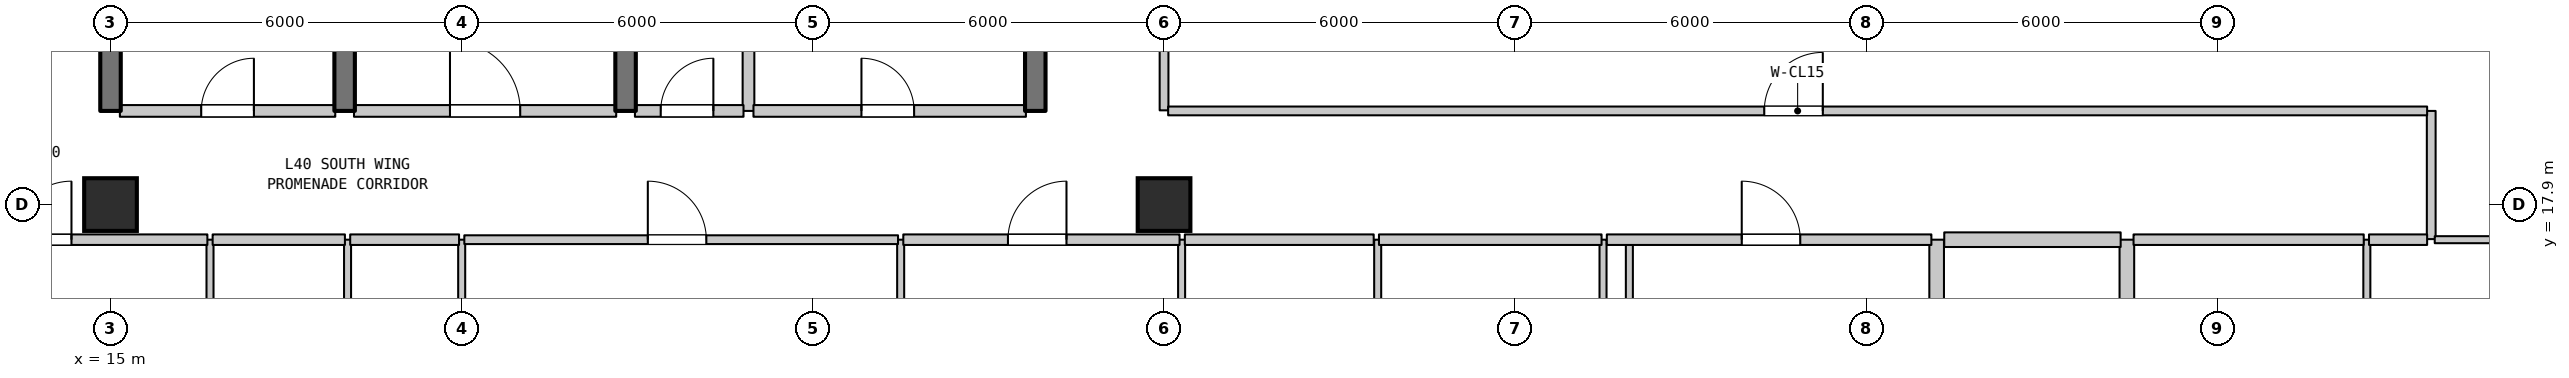
"""IFC4 building model, lengths in metres.
Left out: names, types, materials, properties, quantities, classifications, styles, units other than length and angle.
Written with IfcOpenShell. Run it as: python <this file> out.ifc"""

import sys

from ifc_helpers import new_model, si_unit, direction, frame, frame_2d, origin, origin_2d, place, context, subcontext, project, spatial, rectangle, extrude, element, fill, save


model = new_model("IFC4")
c1 = context("Model", 3, precision=1e-05, world=origin(), true_north=direction((0.0, 1.0)))
c2 = subcontext(c1, "Body", "Model", "MODEL_VIEW")
j1 = project(units=[si_unit("LENGTHUNIT", "METRE"), si_unit("PLANEANGLEUNIT", "RADIAN")], contexts=[c1])
p1 = place(None, origin())
s1 = spatial("IfcSite", under=j1, at=p1, CompositionType="ELEMENT")
p2 = place(p1, origin())
s2 = spatial("IfcBuilding", under=s1, at=p2, CompositionType="ELEMENT")
p3 = place(p2, frame((0.0, 0.0, 164.6)))
s3 = spatial("IfcBuildingStorey", under=s2, at=p3, CompositionType="ELEMENT", Elevation=164.6)
for number, where, z_axis, x_axis in (
    (1, (15.0, 17.9, 0.0), (0.0, 0.0, 1.0), (1.0, 0.0, 0.0)),
    (2, (33.0, 17.9, 0.0), (0.0, 0.0, 1.0), (1.0, 0.0, 0.0)),
):
    element("IfcColumn", number, at=place(p3, frame(where, z_axis=z_axis, x_axis=x_axis)), inside=s3, PredefinedType="COLUMN", context=c2, shape_type="SweptSolid", body=[
        extrude(rectangle(XDim=0.9, YDim=0.9, at=origin_2d()), origin(), (0.0, 0.0, 1.0), 4.5),
    ])
p4 = place(p3, frame((15.0, 19.5, 0.0), z_axis=(0.0, 0.0, 1.0), x_axis=(0.0, 1.0, 0.0)))
e3 = element("IfcWall", 3, at=p4, inside=s3, PredefinedType="SHEAR", context=c2, shape_type="SweptSolid", body=[
    extrude(rectangle(XDim=3.2, YDim=0.35, at=frame_2d((1.6, 0.0))), origin(), (0.0, 0.0, 1.0), 4.19),
])
p5 = place(p3, frame((16.7, 14.1, 0.0), z_axis=(0.0, 0.0, 1.0), x_axis=(0.0, 1.0, 0.0)))
e4 = element("IfcWall", 4, at=p5, inside=s3, PredefinedType="PARTITIONING", context=c2, shape_type="SweptSolid", body=[
    extrude(rectangle(XDim=3.2, YDim=0.12, at=frame_2d((1.6, 0.0))), origin(), (0.0, 0.0, 1.0), 4.19),
])
p6 = place(p5, frame((1.15, 0.0, 0.0)))
e5 = element("IfcOpeningElement", 5, at=p6, cuts=e4, PredefinedType="OPENING", context=c2, shape_type="SweptSolid", body=[
    extrude(rectangle(XDim=0.9, YDim=2.15, at=frame_2d((0.45, 1.075))), frame((0.0, 0.07, 0.0), z_axis=(0.0, -1.0, 0.0), x_axis=(1.0, 0.0, 0.0)), (0.0, 0.0, 1.0), 0.14),
])
p7 = place(p3, frame((19.0, 19.5, 0.0), z_axis=(0.0, 0.0, 1.0), x_axis=(0.0, 1.0, 0.0)))
e6 = element("IfcWall", 6, at=p7, inside=s3, PredefinedType="SHEAR", context=c2, shape_type="SweptSolid", body=[
    extrude(rectangle(XDim=3.2, YDim=0.35, at=frame_2d((1.6, 0.0))), origin(), (0.0, 0.0, 1.0), 4.19),
])
p8 = place(p3, frame((19.05, 14.1, 0.0), z_axis=(0.0, 0.0, 1.0), x_axis=(0.0, 1.0, 0.0)))
e7 = element("IfcWall", 7, at=p8, inside=s3, PredefinedType="PARTITIONING", context=c2, shape_type="SweptSolid", body=[
    extrude(rectangle(XDim=3.2, YDim=0.12, at=frame_2d((1.6, 0.0))), origin(), (0.0, 0.0, 1.0), 4.19),
])
p9 = place(p3, frame((21.0, 6.71, 0.0), z_axis=(0.0, 0.0, 1.0), x_axis=(0.0, 1.0, 0.0)))
e8 = element("IfcWall", 8, at=p9, inside=s3, PredefinedType="PARTITIONING", context=c2, shape_type="SweptSolid", body=[
    extrude(rectangle(XDim=10.59, YDim=0.12, at=frame_2d((5.295, 0.0))), origin(), (0.0, 0.0, 1.0), 4.19),
])
p10 = place(p3, frame((23.8, 19.5, 0.0), z_axis=(0.0, 0.0, 1.0), x_axis=(0.0, 1.0, 0.0)))
e9 = element("IfcWall", 9, at=p10, inside=s3, PredefinedType="SHEAR", context=c2, shape_type="SweptSolid", body=[
    extrude(rectangle(XDim=3.2, YDim=0.35, at=frame_2d((1.6, 0.0))), origin(), (0.0, 0.0, 1.0), 4.19),
])
p11 = place(p3, frame((25.9, 19.5, 0.0), z_axis=(0.0, 0.0, 1.0), x_axis=(0.0, 1.0, 0.0)))
e10 = element("IfcWall", 10, at=p11, inside=s3, PredefinedType="STANDARD", context=c2, shape_type="SweptSolid", body=[
    extrude(rectangle(XDim=3.2, YDim=0.2, at=frame_2d((1.6, 0.0))), origin(), (0.0, 0.0, 1.0), 4.19),
])
p12 = place(p3, frame((28.5, 14.85, 0.0), z_axis=(0.0, 0.0, 1.0), x_axis=(0.0, 1.0, 0.0)))
e11 = element("IfcWall", 11, at=p12, inside=s3, PredefinedType="PARTITIONING", context=c2, shape_type="SweptSolid", body=[
    extrude(rectangle(XDim=2.45, YDim=0.12, at=frame_2d((1.225, 0.0))), origin(), (0.0, 0.0, 1.0), 4.19),
])
p13 = place(p3, frame((30.8, 19.5, 0.0), z_axis=(0.0, 0.0, 1.0), x_axis=(0.0, 1.0, 0.0)))
e12 = element("IfcWall", 12, at=p13, inside=s3, PredefinedType="SHEAR", context=c2, shape_type="SweptSolid", body=[
    extrude(rectangle(XDim=3.2, YDim=0.35, at=frame_2d((1.6, 0.0))), origin(), (0.0, 0.0, 1.0), 4.19),
])
p14 = place(p3, frame((33.0, 19.51, 0.0), z_axis=(0.0, 0.0, 1.0), x_axis=(0.0, 1.0, 0.0)))
e13 = element("IfcWall", 13, at=p14, inside=s3, PredefinedType="STANDARD", context=c2, shape_type="SweptSolid", body=[
    extrude(rectangle(XDim=5.35, YDim=0.15, at=frame_2d((2.675, 0.0))), origin(), (0.0, 0.0, 1.0), 3.79),
])
p15 = place(p14, frame((1.534, 0.0, 0.0)))
e14 = element("IfcOpeningElement", 14, at=p15, cuts=e13, PredefinedType="OPENING", context=c2, shape_type="SweptSolid", body=[
    extrude(rectangle(XDim=1.0, YDim=2.15, at=frame_2d((0.5, 1.075))), frame((0.0, 0.085, 0.0), z_axis=(0.0, -1.0, 0.0), x_axis=(1.0, 0.0, 0.0)), (0.0, 0.0, 1.0), 0.17),
])
for number, where, z_axis, x_axis in (
    (15, (33.3, 11.15, 0.0), (0.0, 0.0, 1.0), (0.0, 1.0, 0.0)),
    (16, (36.65, 11.15, 0.0), (0.0, 0.0, 1.0), (0.0, 1.0, 0.0)),
    (17, (40.5, 11.15, 0.0), (0.0, 0.0, 1.0), (0.0, 1.0, 0.0)),
):
    element("IfcWall", number, at=place(p3, frame(where, z_axis=z_axis, x_axis=x_axis)), inside=s3, PredefinedType="PARTITIONING", context=c2, shape_type="SweptSolid", body=[
        extrude(rectangle(XDim=6.15, YDim=0.12, at=frame_2d((3.075, 0.0))), origin(), (0.0, 0.0, 1.0), 4.19),
    ])
p16 = place(p3, frame((40.95, 14.85, 0.0), z_axis=(0.0, 0.0, 1.0), x_axis=(0.0, 1.0, 0.0)))
e18 = element("IfcWall", 18, at=p16, inside=s3, PredefinedType="PARTITIONING", context=c2, shape_type="SweptSolid", body=[
    extrude(rectangle(XDim=2.45, YDim=0.12, at=frame_2d((1.225, 0.0))), origin(), (0.0, 0.0, 1.0), 4.19),
])
for number, where, z_axis, x_axis in (
    (19, (46.2, 11.15, 0.0), (0.0, 0.0, 1.0), (0.0, 1.0, 0.0)),
    (20, (49.45, 11.15, 0.0), (0.0, 0.0, 1.0), (0.0, 1.0, 0.0)),
):
    element("IfcWall", number, at=place(p3, frame(where, z_axis=z_axis, x_axis=x_axis)), inside=s3, PredefinedType="STANDARD", context=c2, shape_type="SweptSolid", body=[
        extrude(rectangle(XDim=6.15, YDim=0.25, at=frame_2d((3.075, 0.0))), origin(), (0.0, 0.0, 1.0), 4.19),
    ])
p17 = place(p3, frame((53.55, 11.15, 0.0), z_axis=(0.0, 0.0, 1.0), x_axis=(0.0, 1.0, 0.0)))
e21 = element("IfcWall", 21, at=p17, inside=s3, PredefinedType="PARTITIONING", context=c2, shape_type="SweptSolid", body=[
    extrude(rectangle(XDim=6.15, YDim=0.12, at=frame_2d((3.075, 0.0))), origin(), (0.0, 0.0, 1.0), 4.19),
])
p18 = place(p3, frame((54.65, 17.31, 0.0), z_axis=(0.0, 0.0, 1.0), x_axis=(0.0, 1.0, 0.0)))
e22 = element("IfcWall", 22, at=p18, inside=s3, PredefinedType="STANDARD", context=c2, shape_type="SweptSolid", body=[
    extrude(rectangle(XDim=2.19, YDim=0.15, at=frame_2d((1.095, 0.0))), origin(), (0.0, 0.0, 1.0), 4.19),
])
p19 = place(p3, frame((12.875, 17.3, 0.0), z_axis=(0.0, 0.0, 1.0), x_axis=(1.0, 0.0, 0.0)))
e23 = element("IfcWall", 23, at=p19, inside=s3, PredefinedType="STANDARD", context=c2, shape_type="SweptSolid", body=[
    extrude(rectangle(XDim=3.78, YDim=0.18, at=frame_2d((1.89, 0.0))), origin(), (0.0, 0.0, 1.0), 4.19),
])
p20 = place(p19, frame((0.458, 0.0, 0.0)))
e24 = element("IfcOpeningElement", 24, at=p20, cuts=e23, PredefinedType="OPENING", context=c2, shape_type="SweptSolid", body=[
    extrude(rectangle(XDim=1.0, YDim=2.15, at=frame_2d((0.5, 1.075))), frame((0.0, 0.1, 0.0), z_axis=(0.0, -1.0, 0.0), x_axis=(1.0, 0.0, 0.0)), (0.0, 0.0, 1.0), 0.2),
])
p21 = place(p3, frame((16.745, 17.3, 0.0), z_axis=(0.0, 0.0, 1.0), x_axis=(1.0, 0.0, 0.0)))
e25 = element("IfcWall", 25, at=p21, inside=s3, PredefinedType="STANDARD", context=c2, shape_type="SweptSolid", body=[
    extrude(rectangle(XDim=2.26, YDim=0.18, at=frame_2d((1.13, 0.0))), origin(), (0.0, 0.0, 1.0), 4.19),
])
p22 = place(p3, frame((19.095, 17.3, 0.0), z_axis=(0.0, 0.0, 1.0), x_axis=(1.0, 0.0, 0.0)))
e26 = element("IfcWall", 26, at=p22, inside=s3, PredefinedType="STANDARD", context=c2, shape_type="SweptSolid", body=[
    extrude(rectangle(XDim=1.86, YDim=0.18, at=frame_2d((0.93, 0.0))), origin(), (0.0, 0.0, 1.0), 4.19),
])
p23 = place(p3, frame((21.045, 17.3, 0.0), z_axis=(0.0, 0.0, 1.0), x_axis=(1.0, 0.0, 0.0)))
e27 = element("IfcWall", 27, at=p23, inside=s3, PredefinedType="STANDARD", context=c2, shape_type="SweptSolid", body=[
    extrude(rectangle(XDim=7.41, YDim=0.15, at=frame_2d((3.705, 0.0))), origin(), (0.0, 0.0, 1.0), 4.19),
])
p24 = place(p23, frame((3.135, 0.0, 0.0)))
e28 = element("IfcOpeningElement", 28, at=p24, cuts=e27, PredefinedType="OPENING", context=c2, shape_type="SweptSolid", body=[
    extrude(rectangle(XDim=1.0, YDim=2.15, at=frame_2d((0.5, 1.075))), frame((0.0, 0.085, 0.0), z_axis=(0.0, -1.0, 0.0), x_axis=(1.0, 0.0, 0.0)), (0.0, 0.0, 1.0), 0.17),
])
p25 = place(p3, frame((28.545, 17.3, 0.0), z_axis=(0.0, 0.0, 1.0), x_axis=(1.0, 0.0, 0.0)))
e29 = element("IfcWall", 29, at=p25, inside=s3, PredefinedType="STANDARD", context=c2, shape_type="SweptSolid", body=[
    extrude(rectangle(XDim=4.72, YDim=0.18, at=frame_2d((2.36, 0.0))), origin(), (0.0, 0.0, 1.0), 4.19),
])
p26 = place(p25, frame((1.788, 0.0, 0.0)))
e30 = element("IfcOpeningElement", 30, at=p26, cuts=e29, PredefinedType="OPENING", context=c2, shape_type="SweptSolid", body=[
    extrude(rectangle(XDim=1.0, YDim=2.15, at=frame_2d((0.5, 1.075))), frame((0.0, 0.1, 0.0), z_axis=(0.0, -1.0, 0.0), x_axis=(1.0, 0.0, 0.0)), (0.0, 0.0, 1.0), 0.2),
])
p27 = place(p3, frame((33.355, 17.3, 0.0), z_axis=(0.0, 0.0, 1.0), x_axis=(1.0, 0.0, 0.0)))
e31 = element("IfcWall", 31, at=p27, inside=s3, PredefinedType="STANDARD", context=c2, shape_type="SweptSolid", body=[
    extrude(rectangle(XDim=3.227, YDim=0.18, at=frame_2d((1.614, 0.0))), origin(), (0.0, 0.0, 1.0), 4.19),
])
p28 = place(p3, frame((36.672, 17.3, 0.0), z_axis=(0.0, 0.0, 1.0), x_axis=(1.0, 0.0, 0.0)))
e32 = element("IfcWall", 32, at=p28, inside=s3, PredefinedType="STANDARD", context=c2, shape_type="SweptSolid", body=[
    extrude(rectangle(XDim=3.803, YDim=0.18, at=frame_2d((1.901, 0.0))), origin(), (0.0, 0.0, 1.0), 4.19),
])
p29 = place(p3, frame((40.565, 17.3, 0.0), z_axis=(0.0, 0.0, 1.0), x_axis=(1.0, 0.0, 0.0)))
e33 = element("IfcWall", 33, at=p29, inside=s3, PredefinedType="STANDARD", context=c2, shape_type="SweptSolid", body=[
    extrude(rectangle(XDim=5.545, YDim=0.18, at=frame_2d((2.772, 0.0))), origin(), (0.0, 0.0, 1.0), 4.19),
])
p30 = place(p29, frame((2.305, 0.0, 0.0)))
e34 = element("IfcOpeningElement", 34, at=p30, cuts=e33, PredefinedType="OPENING", context=c2, shape_type="SweptSolid", body=[
    extrude(rectangle(XDim=1.0, YDim=2.15, at=frame_2d((0.5, 1.075))), frame((0.0, 0.1, 0.0), z_axis=(0.0, -1.0, 0.0), x_axis=(1.0, 0.0, 0.0)), (0.0, 0.0, 1.0), 0.2),
])
p31 = place(p3, frame((46.33, 17.3, 0.0), z_axis=(0.0, 0.0, 1.0), x_axis=(1.0, 0.0, 0.0)))
e35 = element("IfcWall", 35, at=p31, inside=s3, PredefinedType="STANDARD", context=c2, shape_type="SweptSolid", body=[
    extrude(rectangle(XDim=3.014, YDim=0.25, at=frame_2d((1.507, 0.0))), origin(), (0.0, 0.0, 1.0), 4.19),
])
p32 = place(p3, frame((49.564, 17.3, 0.0), z_axis=(0.0, 0.0, 1.0), x_axis=(1.0, 0.0, 0.0)))
e36 = element("IfcWall", 36, at=p32, inside=s3, PredefinedType="STANDARD", context=c2, shape_type="SweptSolid", body=[
    extrude(rectangle(XDim=3.933, YDim=0.18, at=frame_2d((1.967, 0.0))), origin(), (0.0, 0.0, 1.0), 4.19),
])
p33 = place(p3, frame((53.587, 17.3, 0.0), z_axis=(0.0, 0.0, 1.0), x_axis=(1.0, 0.0, 0.0)))
e37 = element("IfcWall", 37, at=p33, inside=s3, PredefinedType="STANDARD", context=c2, shape_type="SweptSolid", body=[
    extrude(rectangle(XDim=0.993, YDim=0.18, at=frame_2d((0.497, 0.0))), origin(), (0.0, 0.0, 1.0), 4.19),
])
p34 = place(p3, frame((54.71, 17.3, 0.0), z_axis=(0.0, 0.0, 1.0), x_axis=(1.0, 0.0, 0.0)))
e38 = element("IfcWall", 38, at=p34, inside=s3, PredefinedType="PARTITIONING", context=c2, shape_type="SweptSolid", body=[
    extrude(rectangle(XDim=1.635, YDim=0.12, at=frame_2d((0.817, 0.0))), origin(), (0.0, 0.0, 1.0), 4.19),
])
p35 = place(p3, frame((15.16, 19.5, 0.0), z_axis=(0.0, 0.0, 1.0), x_axis=(1.0, 0.0, 0.0)))
e39 = element("IfcWall", 39, at=p35, inside=s3, PredefinedType="STANDARD", context=c2, shape_type="SweptSolid", body=[
    extrude(rectangle(XDim=3.68, YDim=0.2, at=frame_2d((1.84, 0.0))), origin(), (0.0, 0.0, 1.0), 4.19),
])
p36 = place(p35, frame((1.39, 0.0, 0.0)))
e40 = element("IfcOpeningElement", 40, at=p36, cuts=e39, PredefinedType="OPENING", context=c2, shape_type="SweptSolid", body=[
    extrude(rectangle(XDim=0.9, YDim=2.15, at=frame_2d((0.45, 1.075))), frame((0.0, 0.11, 0.0), z_axis=(0.0, -1.0, 0.0), x_axis=(1.0, 0.0, 0.0)), (0.0, 0.0, 1.0), 0.22),
])
p37 = place(p3, frame((19.16, 19.5, 0.0), z_axis=(0.0, 0.0, 1.0), x_axis=(1.0, 0.0, 0.0)))
e41 = element("IfcWall", 41, at=p37, inside=s3, PredefinedType="STANDARD", context=c2, shape_type="SweptSolid", body=[
    extrude(rectangle(XDim=4.48, YDim=0.2, at=frame_2d((2.24, 0.0))), origin(), (0.0, 0.0, 1.0), 4.19),
])
p38 = place(p37, frame((1.64, 0.0, 0.0)))
e42 = element("IfcOpeningElement", 42, at=p38, cuts=e41, PredefinedType="OPENING", context=c2, shape_type="SweptSolid", body=[
    extrude(rectangle(XDim=1.2, YDim=2.2, at=frame_2d((0.6, 1.1))), frame((0.0, 0.11, 0.0), z_axis=(0.0, -1.0, 0.0), x_axis=(1.0, 0.0, 0.0)), (0.0, 0.0, 1.0), 0.22),
])
p39 = place(p3, frame((23.96, 19.5, 0.0), z_axis=(0.0, 0.0, 1.0), x_axis=(1.0, 0.0, 0.0)))
e43 = element("IfcWall", 43, at=p39, inside=s3, PredefinedType="STANDARD", context=c2, shape_type="SweptSolid", body=[
    extrude(rectangle(XDim=1.855, YDim=0.2, at=frame_2d((0.927, 0.0))), origin(), (0.0, 0.0, 1.0), 4.19),
])
p40 = place(p39, frame((0.44, 0.0, 0.0)))
e44 = element("IfcOpeningElement", 44, at=p40, cuts=e43, PredefinedType="OPENING", context=c2, shape_type="SweptSolid", body=[
    extrude(rectangle(XDim=0.9, YDim=2.15, at=frame_2d((0.45, 1.075))), frame((0.0, 0.11, 0.0), z_axis=(0.0, -1.0, 0.0), x_axis=(1.0, 0.0, 0.0)), (0.0, 0.0, 1.0), 0.22),
])
p41 = place(p3, frame((25.985, 19.5, 0.0), z_axis=(0.0, 0.0, 1.0), x_axis=(1.0, 0.0, 0.0)))
e45 = element("IfcWall", 45, at=p41, inside=s3, PredefinedType="STANDARD", context=c2, shape_type="SweptSolid", body=[
    extrude(rectangle(XDim=4.655, YDim=0.2, at=frame_2d((2.327, 0.0))), origin(), (0.0, 0.0, 1.0), 4.19),
])
p42 = place(p41, frame((1.845, 0.0, 0.0)))
e46 = element("IfcOpeningElement", 46, at=p42, cuts=e45, PredefinedType="OPENING", context=c2, shape_type="SweptSolid", body=[
    extrude(rectangle(XDim=0.9, YDim=2.15, at=frame_2d((0.45, 1.075))), frame((0.0, 0.11, 0.0), z_axis=(0.0, -1.0, 0.0), x_axis=(1.0, 0.0, 0.0)), (0.0, 0.0, 1.0), 0.22),
])
p43 = place(p3, frame((33.07, 19.5, 0.0), z_axis=(0.0, 0.0, 1.0), x_axis=(1.0, 0.0, 0.0)))
e47 = element("IfcWall", 47, at=p43, inside=s3, PredefinedType="STANDARD", context=c2, shape_type="SweptSolid", body=[
    extrude(rectangle(XDim=21.51, YDim=0.15, at=frame_2d((10.755, 0.0))), origin(), (0.0, 0.0, 1.0), 4.19),
])
p44 = place(p43, frame((10.185, 0.0, 0.0)))
e48 = element("IfcOpeningElement", 48, at=p44, cuts=e47, PredefinedType="OPENING", context=c2, shape_type="SweptSolid", body=[
    extrude(rectangle(XDim=1.0, YDim=2.15, at=frame_2d((0.5, 1.075))), frame((0.0, 0.085, 0.0), z_axis=(0.0, -1.0, 0.0), x_axis=(1.0, 0.0, 0.0)), (0.0, 0.0, 1.0), 0.17),
])
p45 = place(p20, origin())
e49 = element("IfcDoor", 49, at=p45, inside=s3, OperationType="SINGLE_SWING_RIGHT", PredefinedType="DOOR", context=c2, shape_type="SweptSolid", body=[
    extrude(rectangle(XDim=1.0, YDim=2.15, at=frame_2d((0.5, 1.075))), frame((0.0, 0.025, 0.0), z_axis=(0.0, -1.0, 0.0), x_axis=(1.0, 0.0, 0.0)), (0.0, 0.0, 1.0), 0.05),
])
fill(e24, e49)
p46 = place(p24, origin())
e50 = element("IfcDoor", 50, at=p46, inside=s3, OperationType="SINGLE_SWING_LEFT", PredefinedType="DOOR", context=c2, shape_type="SweptSolid", body=[
    extrude(rectangle(XDim=1.0, YDim=2.15, at=frame_2d((0.5, 1.075))), frame((0.0, 0.025, 0.0), z_axis=(0.0, -1.0, 0.0), x_axis=(1.0, 0.0, 0.0)), (0.0, 0.0, 1.0), 0.05),
])
fill(e28, e50)
p47 = place(p26, origin())
e51 = element("IfcDoor", 51, at=p47, inside=s3, OperationType="SINGLE_SWING_RIGHT", PredefinedType="DOOR", context=c2, shape_type="SweptSolid", body=[
    extrude(rectangle(XDim=1.0, YDim=2.15, at=frame_2d((0.5, 1.075))), frame((0.0, 0.025, 0.0), z_axis=(0.0, -1.0, 0.0), x_axis=(1.0, 0.0, 0.0)), (0.0, 0.0, 1.0), 0.05),
])
fill(e30, e51)
p48 = place(p30, origin())
e52 = element("IfcDoor", 52, at=p48, inside=s3, OperationType="SINGLE_SWING_LEFT", PredefinedType="DOOR", context=c2, shape_type="SweptSolid", body=[
    extrude(rectangle(XDim=1.0, YDim=2.15, at=frame_2d((0.5, 1.075))), frame((0.0, 0.025, 0.0), z_axis=(0.0, -1.0, 0.0), x_axis=(1.0, 0.0, 0.0)), (0.0, 0.0, 1.0), 0.05),
])
fill(e34, e52)
p49 = place(p36, origin())
e53 = element("IfcDoor", 53, at=p49, inside=s3, OperationType="SINGLE_SWING_RIGHT", PredefinedType="DOOR", context=c2, shape_type="SweptSolid", body=[
    extrude(rectangle(XDim=0.9, YDim=2.15, at=frame_2d((0.45, 1.075))), frame((0.0, 0.025, 0.0), z_axis=(0.0, -1.0, 0.0), x_axis=(1.0, 0.0, 0.0)), (0.0, 0.0, 1.0), 0.05),
])
fill(e40, e53)
p50 = place(p38, origin())
e54 = element("IfcDoor", 54, at=p50, inside=s3, OperationType="SINGLE_SWING_LEFT", PredefinedType="DOOR", context=c2, shape_type="SweptSolid", body=[
    extrude(rectangle(XDim=1.2, YDim=2.2, at=frame_2d((0.6, 1.1))), frame((0.0, 0.025, 0.0), z_axis=(0.0, -1.0, 0.0), x_axis=(1.0, 0.0, 0.0)), (0.0, 0.0, 1.0), 0.05),
])
fill(e42, e54)
p51 = place(p40, origin())
e55 = element("IfcDoor", 55, at=p51, inside=s3, OperationType="SINGLE_SWING_RIGHT", PredefinedType="DOOR", context=c2, shape_type="SweptSolid", body=[
    extrude(rectangle(XDim=0.9, YDim=2.15, at=frame_2d((0.45, 1.075))), frame((0.0, 0.025, 0.0), z_axis=(0.0, -1.0, 0.0), x_axis=(1.0, 0.0, 0.0)), (0.0, 0.0, 1.0), 0.05),
])
fill(e44, e55)
p52 = place(p42, origin())
e56 = element("IfcDoor", 56, at=p52, inside=s3, OperationType="SINGLE_SWING_LEFT", PredefinedType="DOOR", context=c2, shape_type="SweptSolid", body=[
    extrude(rectangle(XDim=0.9, YDim=2.15, at=frame_2d((0.45, 1.075))), frame((0.0, 0.025, 0.0), z_axis=(0.0, -1.0, 0.0), x_axis=(1.0, 0.0, 0.0)), (0.0, 0.0, 1.0), 0.05),
])
fill(e46, e56)
p53 = place(p44, origin())
e57 = element("IfcDoor", 57, at=p53, inside=s3, OperationType="SINGLE_SWING_RIGHT", PredefinedType="DOOR", context=c2, shape_type="SweptSolid", body=[
    extrude(rectangle(XDim=1.0, YDim=2.15, at=frame_2d((0.5, 1.075))), frame((0.0, 0.025, 0.0), z_axis=(0.0, -1.0, 0.0), x_axis=(1.0, 0.0, 0.0)), (0.0, 0.0, 1.0), 0.05),
])
fill(e48, e57)
save(model, sys.argv[1])
